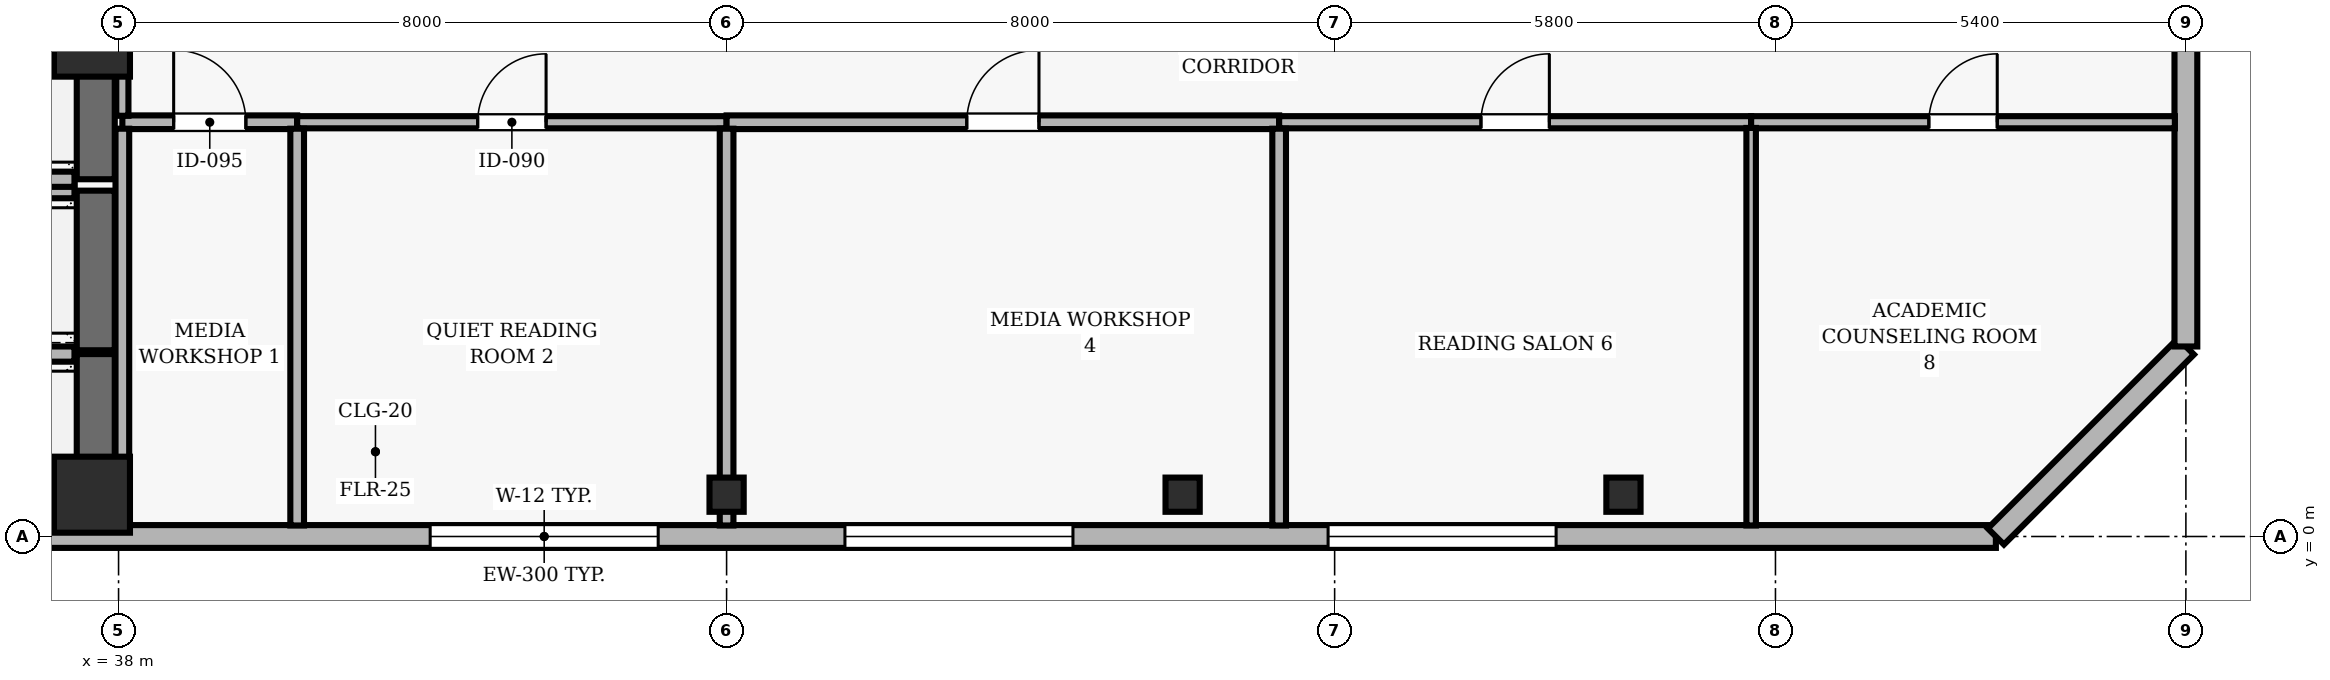
"""IFC4 building model, lengths in metres.
Left out: names, types, materials, properties, quantities, classifications, styles, units other than length and angle.
Written with IfcOpenShell. Run it as: python <this file> out.ifc"""

import sys

from ifc_helpers import new_model, si_unit, direction, frame, frame_2d, origin, origin_2d, place, context, subcontext, project, spatial, rectangle, hollow_rectangle, extrude, element, fill, save


model = new_model("IFC4")
c1 = context("Model", 3, precision=1e-05, world=origin(), true_north=direction((0.0, 1.0)))
c2 = subcontext(c1, "Body", "Model", "MODEL_VIEW")
j1 = project(units=[si_unit("LENGTHUNIT", "METRE"), si_unit("PLANEANGLEUNIT", "RADIAN")], contexts=[c1])
p1 = place(None, origin())
s1 = spatial("IfcSite", under=j1, at=p1, CompositionType="ELEMENT")
p2 = place(p1, origin())
s2 = spatial("IfcBuilding", under=s1, at=p2, CompositionType="ELEMENT")
p3 = place(p2, frame((0.0, 0.0, 195.3)))
s3 = spatial("IfcBuildingStorey", under=s2, at=p3, CompositionType="ELEMENT", Elevation=195.3)
for number, where, z_axis, x_axis in (
    (1, (37.65, 0.55, 0.0), (0.0, 0.0, 1.0), (1.0, 0.0, 0.0)),
    (2, (37.65, 6.55, 0.0), (0.0, 0.0, 1.0), (1.0, 0.0, 0.0)),
):
    element("IfcColumn", number, at=place(p3, frame(where, z_axis=z_axis, x_axis=x_axis)), inside=s3, PredefinedType="COLUMN", context=c2, shape_type="SweptSolid", body=[
        extrude(rectangle(XDim=1.0, YDim=1.0, at=origin_2d()), origin(), (0.0, 0.0, 1.0), 3.9),
    ])
for number, where, z_axis, x_axis in (
    (3, (46.0, 0.55, 0.0), (0.0, 0.0, 1.0), (1.0, 0.0, 0.0)),
    (4, (52.0, 0.55, 0.0), (0.0, 0.0, 1.0), (1.0, 0.0, 0.0)),
    (5, (57.8, 0.55, 0.0), (0.0, 0.0, 1.0), (1.0, 0.0, 0.0)),
):
    element("IfcColumn", number, at=place(p3, frame(where, z_axis=z_axis, x_axis=x_axis)), inside=s3, PredefinedType="COLUMN", context=c2, shape_type="SweptSolid", body=[
        extrude(hollow_rectangle(XDim=0.45, YDim=0.45, WallThickness=0.02, at=origin_2d()), origin(), (0.0, 0.0, 1.0), 3.9),
    ])
p4 = place(p3, frame((24.5, 0.0, 0.0), z_axis=(0.0, 0.0, 1.0), x_axis=(1.0, 0.0, 0.0)))
e6 = element("IfcWall", 6, at=p4, inside=s3, PredefinedType="SOLIDWALL", context=c2, shape_type="SweptSolid", body=[
    extrude(rectangle(XDim=38.2, YDim=0.3, at=frame_2d((19.1, 0.0))), origin(), (0.0, 0.0, 1.0), 3.69),
])
p5 = place(p4, frame((1.229, 0.0, 0.9)))
e7 = element("IfcOpeningElement", 7, at=p5, cuts=e6, PredefinedType="OPENING", context=c2, shape_type="SweptSolid", body=[
    extrude(rectangle(XDim=3.0, YDim=2.2, at=frame_2d((1.5, 1.1))), frame((0.0, 0.16, 0.0), z_axis=(0.0, -1.0, 0.0), x_axis=(1.0, 0.0, 0.0)), (0.0, 0.0, 1.0), 0.32),
])
p6 = place(p4, frame((17.6, 0.0, 0.9)))
e8 = element("IfcOpeningElement", 8, at=p6, cuts=e6, PredefinedType="OPENING", context=c2, shape_type="SweptSolid", body=[
    extrude(rectangle(XDim=3.0, YDim=2.2, at=frame_2d((1.5, 1.1))), frame((0.0, 0.16, 0.0), z_axis=(0.0, -1.0, 0.0), x_axis=(1.0, 0.0, 0.0)), (0.0, 0.0, 1.0), 0.32),
])
p7 = place(p4, frame((23.057, 0.0, 0.9)))
e9 = element("IfcOpeningElement", 9, at=p7, cuts=e6, PredefinedType="OPENING", context=c2, shape_type="SweptSolid", body=[
    extrude(rectangle(XDim=3.0, YDim=2.2, at=frame_2d((1.5, 1.1))), frame((0.0, 0.16, 0.0), z_axis=(0.0, -1.0, 0.0), x_axis=(1.0, 0.0, 0.0)), (0.0, 0.0, 1.0), 0.32),
])
p8 = place(p4, frame((29.414, 0.0, 0.9)))
e10 = element("IfcOpeningElement", 10, at=p8, cuts=e6, PredefinedType="OPENING", context=c2, shape_type="SweptSolid", body=[
    extrude(rectangle(XDim=3.0, YDim=2.2, at=frame_2d((1.5, 1.1))), frame((0.0, 0.16, 0.0), z_axis=(0.0, -1.0, 0.0), x_axis=(1.0, 0.0, 0.0)), (0.0, 0.0, 1.0), 0.32),
])
p9 = place(p3, frame((62.7, 0.0, 0.0), z_axis=(0.0, 0.0, 1.0), x_axis=(0.707106781187, 0.707106781187, 0.0)))
e11 = element("IfcWall", 11, at=p9, inside=s3, PredefinedType="SOLIDWALL", context=c2, shape_type="SweptSolid", body=[
    extrude(rectangle(XDim=3.536, YDim=0.3, at=frame_2d((1.768, 0.0))), origin(), (0.0, 0.0, 1.0), 3.69),
])
p10 = place(p3, frame((65.2, 2.5, 0.0), z_axis=(0.0, 0.0, 1.0), x_axis=(0.0, 1.0, 0.0)))
e12 = element("IfcWall", 12, at=p10, inside=s3, PredefinedType="SOLIDWALL", context=c2, shape_type="SweptSolid", body=[
    extrude(rectangle(XDim=11.0, YDim=0.3, at=frame_2d((5.5, 0.0))), origin(), (0.0, 0.0, 1.0), 3.69),
])
p11 = place(p10, frame((7.5, 0.0, 0.9)))
e13 = element("IfcOpeningElement", 13, at=p11, cuts=e12, PredefinedType="OPENING", context=c2, shape_type="SweptSolid", body=[
    extrude(rectangle(XDim=1.5, YDim=1.6, at=frame_2d((0.75, 0.8))), frame((0.0, 0.16, 0.0), z_axis=(0.0, -1.0, 0.0), x_axis=(1.0, 0.0, 0.0)), (0.0, 0.0, 1.0), 0.32),
])
p12 = place(p3, frame((37.7, 0.3, 0.0), z_axis=(0.0, 0.0, 1.0), x_axis=(0.0, 1.0, 0.0)))
e14 = element("IfcWall", 14, at=p12, inside=s3, PredefinedType="SHEAR", context=c2, shape_type="SweptSolid", body=[
    extrude(rectangle(XDim=2.1, YDim=0.5, at=frame_2d((1.05, 0.0))), origin(), (0.0, 0.0, 1.0), 3.69),
])
for number, where, z_axis, x_axis in (
    (15, (35.28, 0.3, 0.0), (0.0, 0.0, 1.0), (1.0, 0.0, 0.0)),
    (16, (37.42, 2.4, 0.0), (0.0, 0.0, 1.0), (-1.0, 0.0, 0.0)),
):
    element("IfcWall", number, at=place(p3, frame(where, z_axis=z_axis, x_axis=x_axis)), inside=s3, PredefinedType="SOLIDWALL", context=c2, shape_type="SweptSolid", body=[
        extrude(rectangle(XDim=2.14, YDim=0.2, at=frame_2d((1.07, 0.0))), origin(), (0.0, 0.0, 1.0), 3.69),
    ])
p13 = place(p3, frame((37.7, 2.45, 0.0), z_axis=(0.0, 0.0, 1.0), x_axis=(0.0, 1.0, 0.0)))
e17 = element("IfcWall", 17, at=p13, inside=s3, PredefinedType="SHEAR", context=c2, shape_type="SweptSolid", body=[
    extrude(rectangle(XDim=2.1, YDim=0.5, at=frame_2d((1.05, 0.0))), origin(), (0.0, 0.0, 1.0), 3.69),
])
p14 = place(p3, frame((37.42, 4.55, 0.0), z_axis=(0.0, 0.0, 1.0), x_axis=(-1.0, 0.0, 0.0)))
e18 = element("IfcWall", 18, at=p14, inside=s3, PredefinedType="SOLIDWALL", context=c2, shape_type="SweptSolid", body=[
    extrude(rectangle(XDim=2.14, YDim=0.2, at=frame_2d((1.07, 0.0))), origin(), (0.0, 0.0, 1.0), 3.69),
])
p15 = place(p3, frame((37.7, 4.7, 0.0), z_axis=(0.0, 0.0, 1.0), x_axis=(0.0, 1.0, 0.0)))
e19 = element("IfcWall", 19, at=p15, inside=s3, PredefinedType="SHEAR", context=c2, shape_type="SweptSolid", body=[
    extrude(rectangle(XDim=2.25, YDim=0.5, at=frame_2d((1.125, 0.0))), origin(), (0.0, 0.0, 1.0), 3.69),
])
p16 = place(p3, frame((35.28, 4.7, 0.0), z_axis=(0.0, 0.0, 1.0), x_axis=(1.0, 0.0, 0.0)))
e20 = element("IfcWall", 20, at=p16, inside=s3, PredefinedType="SOLIDWALL", context=c2, shape_type="SweptSolid", body=[
    extrude(rectangle(XDim=2.14, YDim=0.2, at=frame_2d((1.07, 0.0))), origin(), (0.0, 0.0, 1.0), 3.69),
])
p17 = place(p3, frame((38.05, 5.45, 0.0), z_axis=(0.0, 0.0, 1.0), x_axis=(1.0, 0.0, 0.0)))
e21 = element("IfcWall", 21, at=p17, inside=s3, PredefinedType="PARTITIONING", context=c2, shape_type="SweptSolid", body=[
    extrude(rectangle(XDim=2.3, YDim=0.18, at=frame_2d((1.15, 0.0))), origin(), (0.0, 0.0, 1.0), 3.372),
])
p18 = place(p17, frame((0.675, 0.0, 0.0)))
e22 = element("IfcOpeningElement", 22, at=p18, cuts=e21, PredefinedType="OPENING", context=c2, shape_type="SweptSolid", body=[
    extrude(rectangle(XDim=0.95, YDim=2.1, at=frame_2d((0.475, 1.05))), frame((0.0, 0.1, 0.0), z_axis=(0.0, -1.0, 0.0), x_axis=(1.0, 0.0, 0.0)), (0.0, 0.0, 1.0), 0.2),
])
p19 = place(p3, frame((40.35, 5.45, 0.0), z_axis=(0.0, 0.0, 1.0), x_axis=(1.0, 0.0, 0.0)))
e23 = element("IfcWall", 23, at=p19, inside=s3, PredefinedType="PARTITIONING", context=c2, shape_type="SweptSolid", body=[
    extrude(rectangle(XDim=5.65, YDim=0.16, at=frame_2d((2.825, 0.0))), origin(), (0.0, 0.0, 1.0), 3.372),
])
p20 = place(p19, frame((2.375, 0.0, 0.0)))
e24 = element("IfcOpeningElement", 24, at=p20, cuts=e23, PredefinedType="OPENING", context=c2, shape_type="SweptSolid", body=[
    extrude(rectangle(XDim=0.9, YDim=2.1, at=frame_2d((0.45, 1.05))), frame((0.0, 0.09, 0.0), z_axis=(0.0, -1.0, 0.0), x_axis=(1.0, 0.0, 0.0)), (0.0, 0.0, 1.0), 0.18),
])
p21 = place(p3, frame((46.0, 5.45, 0.0), z_axis=(0.0, 0.0, 1.0), x_axis=(1.0, 0.0, 0.0)))
e25 = element("IfcWall", 25, at=p21, inside=s3, PredefinedType="PARTITIONING", context=c2, shape_type="SweptSolid", body=[
    extrude(rectangle(XDim=7.27, YDim=0.18, at=frame_2d((3.635, 0.0))), origin(), (0.0, 0.0, 1.0), 3.372),
])
p22 = place(p21, frame((3.16, 0.0, 0.0)))
e26 = element("IfcOpeningElement", 26, at=p22, cuts=e25, PredefinedType="OPENING", context=c2, shape_type="SweptSolid", body=[
    extrude(rectangle(XDim=0.95, YDim=2.1, at=frame_2d((0.475, 1.05))), frame((0.0, 0.1, 0.0), z_axis=(0.0, -1.0, 0.0), x_axis=(1.0, 0.0, 0.0)), (0.0, 0.0, 1.0), 0.2),
])
p23 = place(p3, frame((53.27, 5.45, 0.0), z_axis=(0.0, 0.0, 1.0), x_axis=(1.0, 0.0, 0.0)))
e27 = element("IfcWall", 27, at=p23, inside=s3, PredefinedType="PARTITIONING", context=c2, shape_type="SweptSolid", body=[
    extrude(rectangle(XDim=6.21, YDim=0.16, at=frame_2d((3.105, 0.0))), origin(), (0.0, 0.0, 1.0), 3.372),
])
p24 = place(p23, frame((2.655, 0.0, 0.0)))
e28 = element("IfcOpeningElement", 28, at=p24, cuts=e27, PredefinedType="OPENING", context=c2, shape_type="SweptSolid", body=[
    extrude(rectangle(XDim=0.9, YDim=2.1, at=frame_2d((0.45, 1.05))), frame((0.0, 0.09, 0.0), z_axis=(0.0, -1.0, 0.0), x_axis=(1.0, 0.0, 0.0)), (0.0, 0.0, 1.0), 0.18),
])
p25 = place(p3, frame((59.48, 5.45, 0.0), z_axis=(0.0, 0.0, 1.0), x_axis=(1.0, 0.0, 0.0)))
e29 = element("IfcWall", 29, at=p25, inside=s3, PredefinedType="PARTITIONING", context=c2, shape_type="SweptSolid", body=[
    extrude(rectangle(XDim=5.575, YDim=0.16, at=frame_2d((2.788, 0.0))), origin(), (0.0, 0.0, 1.0), 3.69),
])
p26 = place(p25, frame((2.338, 0.0, 0.0)))
e30 = element("IfcOpeningElement", 30, at=p26, cuts=e29, PredefinedType="OPENING", context=c2, shape_type="SweptSolid", body=[
    extrude(rectangle(XDim=0.9, YDim=2.1, at=frame_2d((0.45, 1.05))), frame((0.0, 0.09, 0.0), z_axis=(0.0, -1.0, 0.0), x_axis=(1.0, 0.0, 0.0)), (0.0, 0.0, 1.0), 0.18),
])
p27 = place(p3, frame((38.05, 5.365, 0.0), z_axis=(0.0, 0.0, 1.0), x_axis=(0.0, -1.0, 0.0)))
e31 = element("IfcWall", 31, at=p27, inside=s3, PredefinedType="PARTITIONING", context=c2, shape_type="SweptSolid", body=[
    extrude(rectangle(XDim=5.22, YDim=0.18, at=frame_2d((2.61, 0.0))), origin(), (0.0, 0.0, 1.0), 3.146),
])
p28 = place(p3, frame((38.05, 7.05, 0.0), z_axis=(0.0, 0.0, 1.0), x_axis=(0.0, -1.0, 0.0)))
e32 = element("IfcWall", 32, at=p28, inside=s3, PredefinedType="PARTITIONING", context=c2, shape_type="SweptSolid", body=[
    extrude(rectangle(XDim=1.515, YDim=0.16, at=frame_2d((0.758, 0.0))), origin(), (0.0, 0.0, 1.0), 3.146),
])
p29 = place(p3, frame((40.35, 0.145, 0.0), z_axis=(0.0, 0.0, 1.0), x_axis=(0.0, 1.0, 0.0)))
e33 = element("IfcWall", 33, at=p29, inside=s3, PredefinedType="PARTITIONING", context=c2, shape_type="SweptSolid", body=[
    extrude(rectangle(XDim=5.22, YDim=0.18, at=frame_2d((2.61, 0.0))), origin(), (0.0, 0.0, 1.0), 3.69),
])
p30 = place(p3, frame((46.0, 0.145, 0.0), z_axis=(0.0, 0.0, 1.0), x_axis=(0.0, 1.0, 0.0)))
e34 = element("IfcWall", 34, at=p30, inside=s3, PredefinedType="PARTITIONING", context=c2, shape_type="SweptSolid", body=[
    extrude(rectangle(XDim=5.22, YDim=0.18, at=frame_2d((2.61, 0.0))), origin(), (0.0, 0.0, 1.0), 3.146),
])
p31 = place(p3, frame((53.27, 0.145, 0.0), z_axis=(0.0, 0.0, 1.0), x_axis=(0.0, 1.0, 0.0)))
e35 = element("IfcWall", 35, at=p31, inside=s3, PredefinedType="PARTITIONING", context=c2, shape_type="SweptSolid", body=[
    extrude(rectangle(XDim=5.22, YDim=0.18, at=frame_2d((2.61, 0.0))), origin(), (0.0, 0.0, 1.0), 3.69),
])
p32 = place(p3, frame((59.48, 0.145, 0.0), z_axis=(0.0, 0.0, 1.0), x_axis=(0.0, 1.0, 0.0)))
e36 = element("IfcWall", 36, at=p32, inside=s3, PredefinedType="PARTITIONING", context=c2, shape_type="SweptSolid", body=[
    extrude(rectangle(XDim=5.23, YDim=0.125, at=frame_2d((2.615, 0.0))), origin(), (0.0, 0.0, 1.0), 3.69),
])
p33 = place(p6, origin())
e37 = element("IfcWindow", 37, at=p33, inside=s3, PartitioningType="SINGLE_PANEL", PredefinedType="WINDOW", context=c2, shape_type="SweptSolid", body=[
    extrude(rectangle(XDim=3.0, YDim=2.2, at=frame_2d((1.5, 1.1))), frame((0.0, 0.03, 0.0), z_axis=(0.0, -1.0, 0.0), x_axis=(1.0, 0.0, 0.0)), (0.0, 0.0, 1.0), 0.06),
])
fill(e8, e37)
p34 = place(p7, origin())
e38 = element("IfcWindow", 38, at=p34, inside=s3, PartitioningType="SINGLE_PANEL", PredefinedType="WINDOW", context=c2, shape_type="SweptSolid", body=[
    extrude(rectangle(XDim=3.0, YDim=2.2, at=frame_2d((1.5, 1.1))), frame((0.0, 0.03, 0.0), z_axis=(0.0, -1.0, 0.0), x_axis=(1.0, 0.0, 0.0)), (0.0, 0.0, 1.0), 0.06),
])
fill(e9, e38)
p35 = place(p8, origin())
e39 = element("IfcWindow", 39, at=p35, inside=s3, PartitioningType="SINGLE_PANEL", PredefinedType="WINDOW", context=c2, shape_type="SweptSolid", body=[
    extrude(rectangle(XDim=3.0, YDim=2.2, at=frame_2d((1.5, 1.1))), frame((0.0, 0.03, 0.0), z_axis=(0.0, -1.0, 0.0), x_axis=(1.0, 0.0, 0.0)), (0.0, 0.0, 1.0), 0.06),
])
fill(e10, e39)
p36 = place(p18, origin())
e40 = element("IfcDoor", 40, at=p36, inside=s3, OperationType="SINGLE_SWING_LEFT", PredefinedType="DOOR", context=c2, shape_type="SweptSolid", body=[
    extrude(rectangle(XDim=0.95, YDim=2.1, at=frame_2d((0.475, 1.05))), frame((0.0, 0.025, 0.0), z_axis=(0.0, -1.0, 0.0), x_axis=(1.0, 0.0, 0.0)), (0.0, 0.0, 1.0), 0.05),
])
fill(e22, e40)
p37 = place(p20, origin())
e41 = element("IfcDoor", 41, at=p37, inside=s3, OperationType="SINGLE_SWING_RIGHT", PredefinedType="DOOR", context=c2, shape_type="SweptSolid", body=[
    extrude(rectangle(XDim=0.9, YDim=2.1, at=frame_2d((0.45, 1.05))), frame((0.0, 0.025, 0.0), z_axis=(0.0, -1.0, 0.0), x_axis=(1.0, 0.0, 0.0)), (0.0, 0.0, 1.0), 0.05),
])
fill(e24, e41)
p38 = place(p22, origin())
e42 = element("IfcDoor", 42, at=p38, inside=s3, OperationType="SINGLE_SWING_RIGHT", PredefinedType="DOOR", context=c2, shape_type="SweptSolid", body=[
    extrude(rectangle(XDim=0.95, YDim=2.1, at=frame_2d((0.475, 1.05))), frame((0.0, 0.025, 0.0), z_axis=(0.0, -1.0, 0.0), x_axis=(1.0, 0.0, 0.0)), (0.0, 0.0, 1.0), 0.05),
])
fill(e26, e42)
p39 = place(p24, origin())
e43 = element("IfcDoor", 43, at=p39, inside=s3, OperationType="SINGLE_SWING_RIGHT", PredefinedType="DOOR", context=c2, shape_type="SweptSolid", body=[
    extrude(rectangle(XDim=0.9, YDim=2.1, at=frame_2d((0.45, 1.05))), frame((0.0, 0.025, 0.0), z_axis=(0.0, -1.0, 0.0), x_axis=(1.0, 0.0, 0.0)), (0.0, 0.0, 1.0), 0.05),
])
fill(e28, e43)
p40 = place(p26, origin())
e44 = element("IfcDoor", 44, at=p40, inside=s3, OperationType="SINGLE_SWING_RIGHT", PredefinedType="DOOR", context=c2, shape_type="SweptSolid", body=[
    extrude(rectangle(XDim=0.9, YDim=2.1, at=frame_2d((0.45, 1.05))), frame((0.0, 0.025, 0.0), z_axis=(0.0, -1.0, 0.0), x_axis=(1.0, 0.0, 0.0)), (0.0, 0.0, 1.0), 0.05),
])
fill(e30, e44)
save(model, sys.argv[1])
